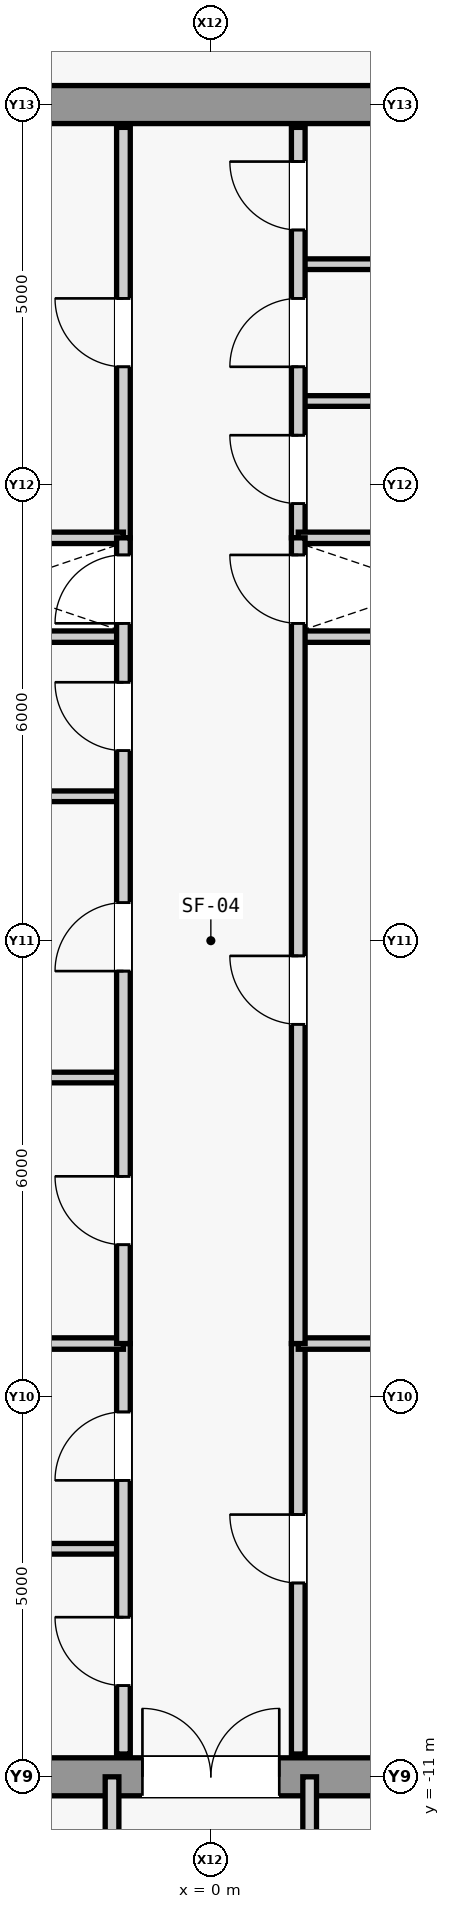
"""IFC4 building model, lengths in metres.
Left out: names, types, materials, properties, quantities, classifications, styles, units other than length and angle.
Written with IfcOpenShell. Run it as: python <this file> out.ifc"""

import sys

from ifc_helpers import new_model, si_unit, direction, frame, frame_2d, origin, place, context, subcontext, project, spatial, rectangle, extrude, source, transform, mapped, element, fill, save


model = new_model("IFC4")
c1 = context("Model", 3, precision=1e-05, world=origin(), true_north=direction((0.0, 1.0)))
c2 = subcontext(c1, "Body", "Model", "MODEL_VIEW")
j1 = project(units=[si_unit("LENGTHUNIT", "METRE"), si_unit("PLANEANGLEUNIT", "RADIAN")], contexts=[c1])
p1 = place(None, origin())
s1 = spatial("IfcSite", under=j1, at=p1, CompositionType="ELEMENT")
p2 = place(p1, origin())
s2 = spatial("IfcBuilding", under=s1, at=p2, CompositionType="ELEMENT")
p3 = place(p2, frame((0.0, 0.0, 330.3)))
s3 = spatial("IfcBuildingStorey", under=s2, at=p3, CompositionType="ELEMENT", Elevation=330.3)
m1 = source(origin(), c2, "Body", "SweptSolid", [
    extrude(rectangle(XDim=9.2, YDim=0.5, at=frame_2d((4.6, 0.0))), origin(), (0.0, 0.0, 1.0), 3.74),
])
p4 = place(p3, frame((-4.6, -11.0, 0.0), z_axis=(0.0, 0.0, 1.0), x_axis=(1.0, 0.0, 0.0)))
e1 = element("IfcWall", 1, at=p4, inside=s3, PredefinedType="SHEAR", context=c2, shape_type="MappedRepresentation", body=[
    mapped(m1, transform((0.0, 0.0, 0.0), scale=1.0)),
])
m2 = source(origin(), c2, "Body", "SweptSolid", [
    extrude(rectangle(XDim=1.8, YDim=2.25, at=frame_2d((0.9, 1.125))), frame((0.0, 0.26, 0.0), z_axis=(0.0, -1.0, 0.0), x_axis=(1.0, 0.0, 0.0)), (0.0, 0.0, 1.0), 0.52),
])
p5 = place(p4, frame((3.7, 0.0, 0.0)))
e2 = element("IfcOpeningElement", 2, at=p5, cuts=e1, PredefinedType="OPENING", context=c2, shape_type="MappedRepresentation", body=[
    mapped(m2, transform((0.0, 0.0, 0.0), scale=1.0)),
])
p6 = place(p3, frame((-4.6, 11.0, 0.0), z_axis=(0.0, 0.0, 1.0), x_axis=(1.0, 0.0, 0.0)))
e3 = element("IfcWall", 3, at=p6, inside=s3, PredefinedType="SHEAR", context=c2, shape_type="MappedRepresentation", body=[
    mapped(m1, transform((0.0, 0.0, 0.0), scale=1.0)),
])
m3 = source(origin(), c2, "Body", "SweptSolid", [
    extrude(rectangle(XDim=3.45, YDim=0.15, at=frame_2d((1.725, 0.0))), origin(), (0.0, 0.0, 1.0), 3.74),
])
for number, where, z_axis, x_axis in (
    (4, (-4.6, 4.0, 0.0), (0.0, 0.0, 1.0), (1.0, 0.0, 0.0)),
    (5, (1.15, 4.0, 0.0), (0.0, 0.0, 1.0), (1.0, 0.0, 0.0)),
):
    element("IfcWall", number, at=place(p3, frame(where, z_axis=z_axis, x_axis=x_axis)), inside=s3, PredefinedType="PARTITIONING", context=c2, shape_type="MappedRepresentation", body=[
        mapped(m3, transform((0.0, 0.0, 0.0), scale=1.0)),
    ])
m4 = source(origin(), c2, "Body", "SweptSolid", [
    extrude(rectangle(XDim=3.45, YDim=0.14, at=frame_2d((1.725, 0.0))), origin(), (0.0, 0.0, 1.0), 3.74),
])
p7 = place(p3, frame((-4.6, -8.0, 0.0), z_axis=(0.0, 0.0, 1.0), x_axis=(1.0, 0.0, 0.0)))
e6 = element("IfcWall", 6, at=p7, inside=s3, PredefinedType="PARTITIONING", context=c2, shape_type="MappedRepresentation", body=[
    mapped(m4, transform((0.0, 0.0, 0.0), scale=1.0)),
])
m5 = source(origin(), c2, "Body", "SweptSolid", [
    extrude(rectangle(XDim=5.4, YDim=0.18, at=frame_2d((2.7, 0.0))), origin(), (0.0, 0.0, 1.0), 3.74),
])
p8 = place(p3, frame((-1.15, -10.7, 0.0), z_axis=(0.0, 0.0, 1.0), x_axis=(0.0, 1.0, 0.0)))
e7 = element("IfcWall", 7, at=p8, inside=s3, PredefinedType="PARTITIONING", context=c2, shape_type="MappedRepresentation", body=[
    mapped(m5, transform((0.0, 0.0, 0.0), scale=1.0)),
])
m6 = source(origin(), c2, "Body", "SweptSolid", [
    extrude(rectangle(XDim=0.9, YDim=2.15, at=frame_2d((0.45, 1.075))), frame((0.0, 0.1, 0.0), z_axis=(0.0, -1.0, 0.0), x_axis=(1.0, 0.0, 0.0)), (0.0, 0.0, 1.0), 0.2),
])
p9 = place(p8, frame((0.9, 0.0, 0.0)))
e8 = element("IfcOpeningElement", 8, at=p9, cuts=e7, PredefinedType="OPENING", context=c2, shape_type="MappedRepresentation", body=[
    mapped(m6, transform((0.0, 0.0, 0.0), scale=1.0)),
])
p10 = place(p8, frame((3.6, 0.0, 0.0)))
e9 = element("IfcOpeningElement", 9, at=p10, cuts=e7, PredefinedType="OPENING", context=c2, shape_type="MappedRepresentation", body=[
    mapped(m6, transform((0.0, 0.0, 0.0), scale=1.0)),
])
p11 = place(p3, frame((1.15, -10.7, 0.0), z_axis=(0.0, 0.0, 1.0), x_axis=(0.0, 1.0, 0.0)))
e10 = element("IfcWall", 10, at=p11, inside=s3, PredefinedType="PARTITIONING", context=c2, shape_type="MappedRepresentation", body=[
    mapped(m5, transform((0.0, 0.0, 0.0), scale=1.0)),
])
p12 = place(p11, frame((2.25, 0.0, 0.0)))
e11 = element("IfcOpeningElement", 11, at=p12, cuts=e10, PredefinedType="OPENING", context=c2, shape_type="MappedRepresentation", body=[
    mapped(m6, transform((0.0, 0.0, 0.0), scale=1.0)),
])
for number, where, z_axis, x_axis in (
    (12, (-4.6, -5.3, 0.0), (0.0, 0.0, 1.0), (1.0, 0.0, 0.0)),
    (13, (1.15, -5.3, 0.0), (0.0, 0.0, 1.0), (1.0, 0.0, 0.0)),
):
    element("IfcWall", number, at=place(p3, frame(where, z_axis=z_axis, x_axis=x_axis)), inside=s3, PredefinedType="PARTITIONING", context=c2, shape_type="MappedRepresentation", body=[
        mapped(m3, transform((0.0, 0.0, 0.0), scale=1.0)),
    ])
p13 = place(p3, frame((-1.15, 5.3, 0.0), z_axis=(0.0, 0.0, 1.0), x_axis=(0.0, 1.0, 0.0)))
e14 = element("IfcWall", 14, at=p13, inside=s3, PredefinedType="PARTITIONING", context=c2, shape_type="MappedRepresentation", body=[
    mapped(m5, transform((0.0, 0.0, 0.0), scale=1.0)),
])
p14 = place(p13, frame((2.25, 0.0, 0.0)))
e15 = element("IfcOpeningElement", 15, at=p14, cuts=e14, PredefinedType="OPENING", context=c2, shape_type="MappedRepresentation", body=[
    mapped(m6, transform((0.0, 0.0, 0.0), scale=1.0)),
])
for number, where, z_axis, x_axis in (
    (16, (1.15, 7.1, 0.0), (0.0, 0.0, 1.0), (1.0, 0.0, 0.0)),
    (17, (1.15, 8.9, 0.0), (0.0, 0.0, 1.0), (1.0, 0.0, 0.0)),
):
    element("IfcWall", number, at=place(p3, frame(where, z_axis=z_axis, x_axis=x_axis)), inside=s3, PredefinedType="PARTITIONING", context=c2, shape_type="MappedRepresentation", body=[
        mapped(m4, transform((0.0, 0.0, 0.0), scale=1.0)),
    ])
p15 = place(p3, frame((1.15, 5.3, 0.0), z_axis=(0.0, 0.0, 1.0), x_axis=(0.0, 1.0, 0.0)))
e18 = element("IfcWall", 18, at=p15, inside=s3, PredefinedType="PARTITIONING", context=c2, shape_type="MappedRepresentation", body=[
    mapped(m5, transform((0.0, 0.0, 0.0), scale=1.0)),
])
p16 = place(p15, frame((0.45, 0.0, 0.0)))
e19 = element("IfcOpeningElement", 19, at=p16, cuts=e18, PredefinedType="OPENING", context=c2, shape_type="MappedRepresentation", body=[
    mapped(m6, transform((0.0, 0.0, 0.0), scale=1.0)),
])
p17 = place(p15, frame((2.25, 0.0, 0.0)))
e20 = element("IfcOpeningElement", 20, at=p17, cuts=e18, PredefinedType="OPENING", context=c2, shape_type="MappedRepresentation", body=[
    mapped(m6, transform((0.0, 0.0, 0.0), scale=1.0)),
])
p18 = place(p15, frame((4.05, 0.0, 0.0)))
e21 = element("IfcOpeningElement", 21, at=p18, cuts=e18, PredefinedType="OPENING", context=c2, shape_type="MappedRepresentation", body=[
    mapped(m6, transform((0.0, 0.0, 0.0), scale=1.0)),
])
for number, where, z_axis, x_axis in (
    (22, (-4.6, 5.3, 0.0), (0.0, 0.0, 1.0), (1.0, 0.0, 0.0)),
    (23, (1.15, 5.3, 0.0), (0.0, 0.0, 1.0), (1.0, 0.0, 0.0)),
):
    element("IfcWall", number, at=place(p3, frame(where, z_axis=z_axis, x_axis=x_axis)), inside=s3, PredefinedType="PARTITIONING", context=c2, shape_type="MappedRepresentation", body=[
        mapped(m3, transform((0.0, 0.0, 0.0), scale=1.0)),
    ])
for number, where, z_axis, x_axis in (
    (24, (-4.6, -1.8, 0.0), (0.0, 0.0, 1.0), (1.0, 0.0, 0.0)),
    (25, (-4.6, 1.9, 0.0), (0.0, 0.0, 1.0), (1.0, 0.0, 0.0)),
):
    element("IfcWall", number, at=place(p3, frame(where, z_axis=z_axis, x_axis=x_axis)), inside=s3, PredefinedType="PARTITIONING", context=c2, shape_type="MappedRepresentation", body=[
        mapped(m4, transform((0.0, 0.0, 0.0), scale=1.0)),
    ])
m7 = source(origin(), c2, "Body", "SweptSolid", [
    extrude(rectangle(XDim=10.6, YDim=0.18, at=frame_2d((5.3, 0.0))), origin(), (0.0, 0.0, 1.0), 3.74),
])
p19 = place(p3, frame((-1.15, -5.3, 0.0), z_axis=(0.0, 0.0, 1.0), x_axis=(0.0, 1.0, 0.0)))
e26 = element("IfcWall", 26, at=p19, inside=s3, PredefinedType="PARTITIONING", context=c2, shape_type="MappedRepresentation", body=[
    mapped(m7, transform((0.0, 0.0, 0.0), scale=1.0)),
])
p20 = place(p19, frame((1.3, 0.0, 0.0)))
e27 = element("IfcOpeningElement", 27, at=p20, cuts=e26, PredefinedType="OPENING", context=c2, shape_type="MappedRepresentation", body=[
    mapped(m6, transform((0.0, 0.0, 0.0), scale=1.0)),
])
p21 = place(p19, frame((4.9, 0.0, 0.0)))
e28 = element("IfcOpeningElement", 28, at=p21, cuts=e26, PredefinedType="OPENING", context=c2, shape_type="MappedRepresentation", body=[
    mapped(m6, transform((0.0, 0.0, 0.0), scale=1.0)),
])
p22 = place(p19, frame((7.8, 0.0, 0.0)))
e29 = element("IfcOpeningElement", 29, at=p22, cuts=e26, PredefinedType="OPENING", context=c2, shape_type="MappedRepresentation", body=[
    mapped(m6, transform((0.0, 0.0, 0.0), scale=1.0)),
])
p23 = place(p19, frame((9.475, 0.0, 0.0)))
e30 = element("IfcOpeningElement", 30, at=p23, cuts=e26, PredefinedType="OPENING", context=c2, shape_type="MappedRepresentation", body=[
    mapped(m6, transform((0.0, 0.0, 0.0), scale=1.0)),
])
p24 = place(p3, frame((1.15, -5.3, 0.0), z_axis=(0.0, 0.0, 1.0), x_axis=(0.0, 1.0, 0.0)))
e31 = element("IfcWall", 31, at=p24, inside=s3, PredefinedType="PARTITIONING", context=c2, shape_type="MappedRepresentation", body=[
    mapped(m7, transform((0.0, 0.0, 0.0), scale=1.0)),
])
p25 = place(p24, frame((4.2, 0.0, 0.0)))
e32 = element("IfcOpeningElement", 32, at=p25, cuts=e31, PredefinedType="OPENING", context=c2, shape_type="MappedRepresentation", body=[
    mapped(m6, transform((0.0, 0.0, 0.0), scale=1.0)),
])
p26 = place(p24, frame((9.475, 0.0, 0.0)))
e33 = element("IfcOpeningElement", 33, at=p26, cuts=e31, PredefinedType="OPENING", context=c2, shape_type="MappedRepresentation", body=[
    mapped(m6, transform((0.0, 0.0, 0.0), scale=1.0)),
])
m8 = source(origin(), c2, "Body", "SweptSolid", [
    extrude(rectangle(XDim=3.2, YDim=0.18, at=frame_2d((1.6, 0.0))), origin(), (0.0, 0.0, 1.0), 3.74),
])
for number, where, z_axis, x_axis in (
    (34, (-1.3, -14.2, 0.0), (0.0, 0.0, 1.0), (0.0, 1.0, 0.0)),
    (35, (1.3, -14.2, 0.0), (0.0, 0.0, 1.0), (0.0, 1.0, 0.0)),
):
    element("IfcWall", number, at=place(p3, frame(where, z_axis=z_axis, x_axis=x_axis)), inside=s3, PredefinedType="PARTITIONING", context=c2, shape_type="MappedRepresentation", body=[
        mapped(m8, transform((0.0, 0.0, 0.0), scale=1.0)),
    ])
m9 = source(origin(), c2, "Body", "SweptSolid", [
    extrude(rectangle(XDim=0.9, YDim=2.15, at=frame_2d((0.45, 1.075))), frame((0.0, 0.025, 0.0), z_axis=(0.0, -1.0, 0.0), x_axis=(1.0, 0.0, 0.0)), (0.0, 0.0, 1.0), 0.05),
])
p27 = place(p9, origin())
e36 = element("IfcDoor", 36, at=p27, inside=s3, OperationType="SINGLE_SWING_RIGHT", PredefinedType="DOOR", context=c2, shape_type="MappedRepresentation", body=[
    mapped(m9, transform((0.0, 0.0, 0.0), scale=1.0)),
])
fill(e8, e36)
p28 = place(p10, origin())
e37 = element("IfcDoor", 37, at=p28, inside=s3, OperationType="SINGLE_SWING_LEFT", PredefinedType="DOOR", context=c2, shape_type="MappedRepresentation", body=[
    mapped(m9, transform((0.0, 0.0, 0.0), scale=1.0)),
])
fill(e9, e37)
p29 = place(p12, origin())
e38 = element("IfcDoor", 38, at=p29, inside=s3, OperationType="SINGLE_SWING_RIGHT", PredefinedType="DOOR", context=c2, shape_type="MappedRepresentation", body=[
    mapped(m9, transform((0.0, 0.0, 0.0), scale=1.0)),
])
fill(e11, e38)
m10 = source(origin(), c2, "Body", "SweptSolid", [
    extrude(rectangle(XDim=1.8, YDim=2.25, at=frame_2d((0.9, 1.125))), frame((0.0, 0.025, 0.0), z_axis=(0.0, -1.0, 0.0), x_axis=(1.0, 0.0, 0.0)), (0.0, 0.0, 1.0), 0.05),
])
p30 = place(p5, origin())
e39 = element("IfcDoor", 39, at=p30, inside=s3, OperationType="SINGLE_SWING_LEFT", PredefinedType="DOOR", context=c2, shape_type="MappedRepresentation", body=[
    mapped(m10, transform((0.0, 0.0, 0.0), scale=1.0)),
])
fill(e2, e39)
p31 = place(p14, origin())
e40 = element("IfcDoor", 40, at=p31, inside=s3, OperationType="SINGLE_SWING_RIGHT", PredefinedType="DOOR", context=c2, shape_type="MappedRepresentation", body=[
    mapped(m9, transform((0.0, 0.0, 0.0), scale=1.0)),
])
fill(e15, e40)
p32 = place(p16, origin())
e41 = element("IfcDoor", 41, at=p32, inside=s3, OperationType="SINGLE_SWING_RIGHT", PredefinedType="DOOR", context=c2, shape_type="MappedRepresentation", body=[
    mapped(m9, transform((0.0, 0.0, 0.0), scale=1.0)),
])
fill(e19, e41)
p33 = place(p17, origin())
e42 = element("IfcDoor", 42, at=p33, inside=s3, OperationType="SINGLE_SWING_LEFT", PredefinedType="DOOR", context=c2, shape_type="MappedRepresentation", body=[
    mapped(m9, transform((0.0, 0.0, 0.0), scale=1.0)),
])
fill(e20, e42)
p34 = place(p18, origin())
e43 = element("IfcDoor", 43, at=p34, inside=s3, OperationType="SINGLE_SWING_RIGHT", PredefinedType="DOOR", context=c2, shape_type="MappedRepresentation", body=[
    mapped(m9, transform((0.0, 0.0, 0.0), scale=1.0)),
])
fill(e21, e43)
p35 = place(p20, origin())
e44 = element("IfcDoor", 44, at=p35, inside=s3, OperationType="SINGLE_SWING_RIGHT", PredefinedType="DOOR", context=c2, shape_type="MappedRepresentation", body=[
    mapped(m9, transform((0.0, 0.0, 0.0), scale=1.0)),
])
fill(e27, e44)
p36 = place(p21, origin())
e45 = element("IfcDoor", 45, at=p36, inside=s3, OperationType="SINGLE_SWING_LEFT", PredefinedType="DOOR", context=c2, shape_type="MappedRepresentation", body=[
    mapped(m9, transform((0.0, 0.0, 0.0), scale=1.0)),
])
fill(e28, e45)
p37 = place(p22, origin())
e46 = element("IfcDoor", 46, at=p37, inside=s3, OperationType="SINGLE_SWING_RIGHT", PredefinedType="DOOR", context=c2, shape_type="MappedRepresentation", body=[
    mapped(m9, transform((0.0, 0.0, 0.0), scale=1.0)),
])
fill(e29, e46)
p38 = place(p25, origin())
e47 = element("IfcDoor", 47, at=p38, inside=s3, OperationType="SINGLE_SWING_RIGHT", PredefinedType="DOOR", context=c2, shape_type="MappedRepresentation", body=[
    mapped(m9, transform((0.0, 0.0, 0.0), scale=1.0)),
])
fill(e32, e47)
p39 = place(p23, origin())
e48 = element("IfcDoor", 48, at=p39, inside=s3, OperationType="SINGLE_SWING_LEFT", PredefinedType="DOOR", context=c2, shape_type="MappedRepresentation", body=[
    mapped(m9, transform((0.0, 0.0, 0.0), scale=1.0)),
])
fill(e30, e48)
p40 = place(p26, origin())
e49 = element("IfcDoor", 49, at=p40, inside=s3, OperationType="SINGLE_SWING_RIGHT", PredefinedType="DOOR", context=c2, shape_type="MappedRepresentation", body=[
    mapped(m9, transform((0.0, 0.0, 0.0), scale=1.0)),
])
fill(e33, e49)
save(model, sys.argv[1])
